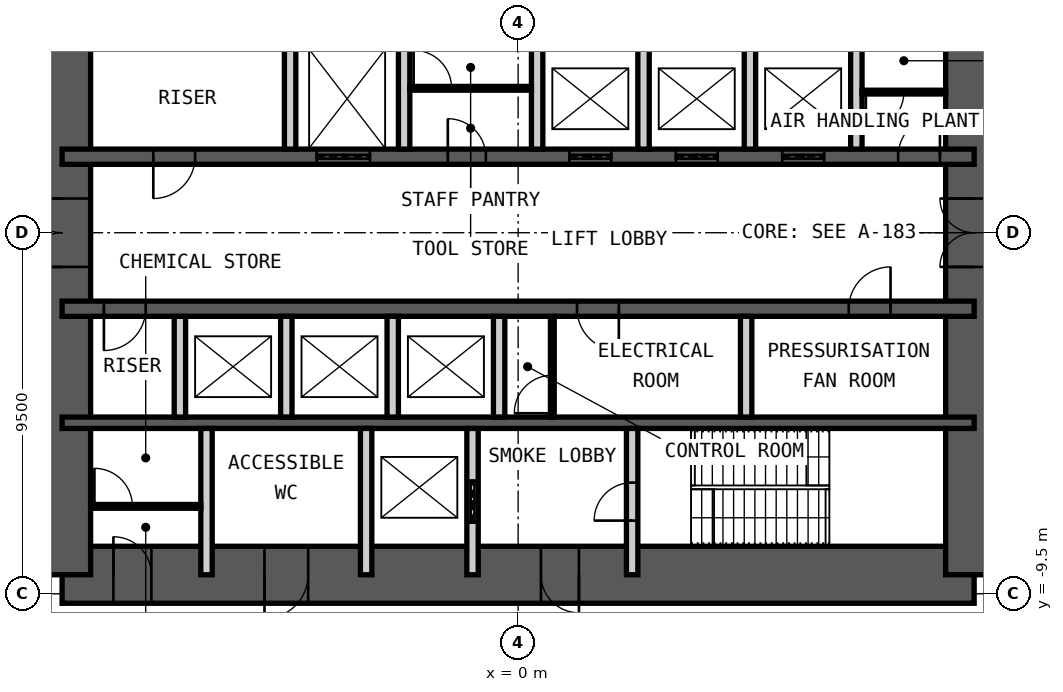
"""IFC4 building model, lengths in metres.
Left out: names, types, materials, properties, quantities, classifications, styles, units other than length and angle.
Written with IfcOpenShell. Run it as: python <this file> out.ifc"""

import sys

from ifc_helpers import new_model, si_unit, direction, frame, frame_2d, origin, place, context, subcontext, project, spatial, rectangle, extrude, element, fill, save


model = new_model("IFC4")
c1 = context("Model", 3, precision=1e-05, world=origin(), true_north=direction((0.0, 1.0)))
c2 = subcontext(c1, "Body", "Model", "MODEL_VIEW")
j1 = project(units=[si_unit("LENGTHUNIT", "METRE"), si_unit("PLANEANGLEUNIT", "RADIAN")], contexts=[c1])
p1 = place(None, origin())
s1 = spatial("IfcSite", under=j1, at=p1, CompositionType="ELEMENT")
p2 = place(p1, origin())
s2 = spatial("IfcBuilding", under=s1, at=p2, CompositionType="ELEMENT")
p3 = place(p2, frame((0.0, 0.0, 67.0)))
s3 = spatial("IfcBuildingStorey", under=s2, at=p3, CompositionType="ELEMENT", Elevation=67.0)
p4 = place(p3, frame((-12.0, -9.0, 0.0), z_axis=(0.0, 0.0, 1.0), x_axis=(1.0, 0.0, 0.0)))
e1 = element("IfcWall", 1, at=p4, inside=s3, PredefinedType="SHEAR", context=c2, shape_type="SweptSolid", body=[
    extrude(rectangle(XDim=24.0, YDim=1.5, at=frame_2d((12.0, 0.0))), origin(), (0.0, 0.0, 1.0), 5.0),
])
p5 = place(p4, frame((1.35, 0.0, 0.0)))
e2 = element("IfcOpeningElement", 2, at=p5, cuts=e1, PredefinedType="OPENING", context=c2, shape_type="SweptSolid", body=[
    extrude(rectangle(XDim=1.0, YDim=2.1, at=frame_2d((0.5, 1.05))), frame((0.0, 0.76, 0.0), z_axis=(0.0, -1.0, 0.0), x_axis=(1.0, 0.0, 0.0)), (0.0, 0.0, 1.0), 1.52),
])
p6 = place(p4, frame((5.325, 0.0, 0.0)))
e3 = element("IfcOpeningElement", 3, at=p6, cuts=e1, PredefinedType="OPENING", context=c2, shape_type="SweptSolid", body=[
    extrude(rectangle(XDim=1.15, YDim=2.1, at=frame_2d((0.575, 1.05))), frame((0.0, 0.76, 0.0), z_axis=(0.0, -1.0, 0.0), x_axis=(1.0, 0.0, 0.0)), (0.0, 0.0, 1.0), 1.52),
])
p7 = place(p4, frame((12.6, 0.0, 0.0)))
e4 = element("IfcOpeningElement", 4, at=p7, cuts=e1, PredefinedType="OPENING", context=c2, shape_type="SweptSolid", body=[
    extrude(rectangle(XDim=1.0, YDim=2.1, at=frame_2d((0.5, 1.05))), frame((0.0, 0.76, 0.0), z_axis=(0.0, -1.0, 0.0), x_axis=(1.0, 0.0, 0.0)), (0.0, 0.0, 1.0), 1.52),
])
p8 = place(p3, frame((12.0, -9.0, 0.0), z_axis=(0.0, 0.0, 1.0), x_axis=(0.0, 1.0, 0.0)))
e5 = element("IfcWall", 5, at=p8, inside=s3, PredefinedType="SHEAR", context=c2, shape_type="SweptSolid", body=[
    extrude(rectangle(XDim=18.0, YDim=1.5, at=frame_2d((9.0, 0.0))), origin(), (0.0, 0.0, 1.0), 5.0),
])
p9 = place(p8, frame((8.1, 0.0, 0.0)))
e6 = element("IfcOpeningElement", 6, at=p9, cuts=e5, PredefinedType="OPENING", context=c2, shape_type="SweptSolid", body=[
    extrude(rectangle(XDim=1.8, YDim=2.1, at=frame_2d((0.9, 1.05))), frame((0.0, 0.76, 0.0), z_axis=(0.0, -1.0, 0.0), x_axis=(1.0, 0.0, 0.0)), (0.0, 0.0, 1.0), 1.52),
])
p10 = place(p3, frame((-12.0, -9.0, 0.0), z_axis=(0.0, 0.0, 1.0), x_axis=(0.0, 1.0, 0.0)))
e7 = element("IfcWall", 7, at=p10, inside=s3, PredefinedType="SHEAR", context=c2, shape_type="SweptSolid", body=[
    extrude(rectangle(XDim=18.0, YDim=1.5, at=frame_2d((9.0, 0.0))), origin(), (0.0, 0.0, 1.0), 5.0),
])
p11 = place(p10, frame((8.1, 0.0, 0.0)))
e8 = element("IfcOpeningElement", 8, at=p11, cuts=e7, PredefinedType="OPENING", context=c2, shape_type="SweptSolid", body=[
    extrude(rectangle(XDim=1.8, YDim=2.1, at=frame_2d((0.9, 1.05))), frame((0.0, 0.76, 0.0), z_axis=(0.0, -1.0, 0.0), x_axis=(1.0, 0.0, 0.0)), (0.0, 0.0, 1.0), 1.52),
])
p12 = place(p3, frame((-12.0, 2.0, 0.0), z_axis=(0.0, 0.0, 1.0), x_axis=(1.0, 0.0, 0.0)))
e9 = element("IfcWall", 9, at=p12, inside=s3, PredefinedType="SHEAR", context=c2, shape_type="SweptSolid", body=[
    extrude(rectangle(XDim=24.0, YDim=0.4, at=frame_2d((12.0, 0.0))), origin(), (0.0, 0.0, 1.0), 5.0),
])
p13 = place(p12, frame((2.4, 0.0, 0.0)))
e10 = element("IfcOpeningElement", 10, at=p13, cuts=e9, PredefinedType="OPENING", context=c2, shape_type="SweptSolid", body=[
    extrude(rectangle(XDim=1.1, YDim=2.1, at=frame_2d((0.55, 1.05))), frame((0.0, 0.21, 0.0), z_axis=(0.0, -1.0, 0.0), x_axis=(1.0, 0.0, 0.0)), (0.0, 0.0, 1.0), 0.42),
])
p14 = place(p12, frame((22.0, 0.0, 0.0)))
e11 = element("IfcOpeningElement", 11, at=p14, cuts=e9, PredefinedType="OPENING", context=c2, shape_type="SweptSolid", body=[
    extrude(rectangle(XDim=1.1, YDim=2.1, at=frame_2d((0.55, 1.05))), frame((0.0, 0.21, 0.0), z_axis=(0.0, -1.0, 0.0), x_axis=(1.0, 0.0, 0.0)), (0.0, 0.0, 1.0), 0.42),
])
p15 = place(p12, frame((10.15, 0.0, 0.0)))
e12 = element("IfcOpeningElement", 12, at=p15, cuts=e9, PredefinedType="OPENING", context=c2, shape_type="SweptSolid", body=[
    extrude(rectangle(XDim=1.0, YDim=2.1, at=frame_2d((0.5, 1.05))), frame((0.0, 0.21, 0.0), z_axis=(0.0, -1.0, 0.0), x_axis=(1.0, 0.0, 0.0)), (0.0, 0.0, 1.0), 0.42),
])
p16 = place(p12, frame((6.7, 0.0, 0.0)))
e13 = element("IfcOpeningElement", 13, at=p16, cuts=e9, PredefinedType="OPENING", context=c2, shape_type="SweptSolid", body=[
    extrude(rectangle(XDim=1.4, YDim=2.4, at=frame_2d((0.7, 1.2))), frame((0.0, 0.21, 0.0), z_axis=(0.0, -1.0, 0.0), x_axis=(1.0, 0.0, 0.0)), (0.0, 0.0, 1.0), 0.42),
])
p17 = place(p12, frame((13.35, 0.0, 0.0)))
e14 = element("IfcOpeningElement", 14, at=p17, cuts=e9, PredefinedType="OPENING", context=c2, shape_type="SweptSolid", body=[
    extrude(rectangle(XDim=1.1, YDim=2.4, at=frame_2d((0.55, 1.2))), frame((0.0, 0.21, 0.0), z_axis=(0.0, -1.0, 0.0), x_axis=(1.0, 0.0, 0.0)), (0.0, 0.0, 1.0), 0.42),
])
p18 = place(p12, frame((16.15, 0.0, 0.0)))
e15 = element("IfcOpeningElement", 15, at=p18, cuts=e9, PredefinedType="OPENING", context=c2, shape_type="SweptSolid", body=[
    extrude(rectangle(XDim=1.1, YDim=2.4, at=frame_2d((0.55, 1.2))), frame((0.0, 0.21, 0.0), z_axis=(0.0, -1.0, 0.0), x_axis=(1.0, 0.0, 0.0)), (0.0, 0.0, 1.0), 0.42),
])
p19 = place(p12, frame((18.95, 0.0, 0.0)))
e16 = element("IfcOpeningElement", 16, at=p19, cuts=e9, PredefinedType="OPENING", context=c2, shape_type="SweptSolid", body=[
    extrude(rectangle(XDim=1.1, YDim=2.4, at=frame_2d((0.55, 1.2))), frame((0.0, 0.21, 0.0), z_axis=(0.0, -1.0, 0.0), x_axis=(1.0, 0.0, 0.0)), (0.0, 0.0, 1.0), 0.42),
])
p20 = place(p3, frame((-12.0, -2.0, 0.0), z_axis=(0.0, 0.0, 1.0), x_axis=(1.0, 0.0, 0.0)))
e17 = element("IfcWall", 17, at=p20, inside=s3, PredefinedType="SHEAR", context=c2, shape_type="SweptSolid", body=[
    extrude(rectangle(XDim=24.0, YDim=0.4, at=frame_2d((12.0, 0.0))), origin(), (0.0, 0.0, 1.0), 5.0),
])
p21 = place(p20, frame((1.1, 0.0, 0.0)))
e18 = element("IfcOpeningElement", 18, at=p21, cuts=e17, PredefinedType="OPENING", context=c2, shape_type="SweptSolid", body=[
    extrude(rectangle(XDim=1.1, YDim=2.1, at=frame_2d((0.55, 1.05))), frame((0.0, 0.21, 0.0), z_axis=(0.0, -1.0, 0.0), x_axis=(1.0, 0.0, 0.0)), (0.0, 0.0, 1.0), 0.42),
])
p22 = place(p20, frame((13.55, 0.0, 0.0)))
e19 = element("IfcOpeningElement", 19, at=p22, cuts=e17, PredefinedType="OPENING", context=c2, shape_type="SweptSolid", body=[
    extrude(rectangle(XDim=1.1, YDim=2.1, at=frame_2d((0.55, 1.05))), frame((0.0, 0.21, 0.0), z_axis=(0.0, -1.0, 0.0), x_axis=(1.0, 0.0, 0.0)), (0.0, 0.0, 1.0), 0.42),
])
p23 = place(p20, frame((20.7, 0.0, 0.0)))
e20 = element("IfcOpeningElement", 20, at=p23, cuts=e17, PredefinedType="OPENING", context=c2, shape_type="SweptSolid", body=[
    extrude(rectangle(XDim=1.1, YDim=2.1, at=frame_2d((0.55, 1.05))), frame((0.0, 0.21, 0.0), z_axis=(0.0, -1.0, 0.0), x_axis=(1.0, 0.0, 0.0)), (0.0, 0.0, 1.0), 0.42),
])
p24 = place(p3, frame((-12.0, -5.0, 0.0), z_axis=(0.0, 0.0, 1.0), x_axis=(1.0, 0.0, 0.0)))
e21 = element("IfcWall", 21, at=p24, inside=s3, PredefinedType="SHEAR", context=c2, shape_type="SweptSolid", body=[
    extrude(rectangle(XDim=24.0, YDim=0.3, at=frame_2d((12.0, 0.0))), origin(), (0.0, 0.0, 1.0), 5.0),
])
for number, where, z_axis, x_axis in (
    (22, (-6.0, 2.2, 0.0), (0.0, 0.0, 1.0), (0.0, 1.0, 0.0)),
    (23, (-3.0, 2.2, 0.0), (0.0, 0.0, 1.0), (0.0, 1.0, 0.0)),
    (24, (0.5, 2.2, 0.0), (0.0, 0.0, 1.0), (0.0, 1.0, 0.0)),
    (25, (3.3, 2.2, 0.0), (0.0, 0.0, 1.0), (0.0, 1.0, 0.0)),
    (26, (6.1, 2.2, 0.0), (0.0, 0.0, 1.0), (0.0, 1.0, 0.0)),
    (27, (8.9, 2.2, 0.0), (0.0, 0.0, 1.0), (0.0, 1.0, 0.0)),
    (28, (-8.9, -4.85, 0.0), (0.0, 0.0, 1.0), (0.0, 1.0, 0.0)),
    (29, (-6.1, -4.85, 0.0), (0.0, 0.0, 1.0), (0.0, 1.0, 0.0)),
    (30, (-3.3, -4.85, 0.0), (0.0, 0.0, 1.0), (0.0, 1.0, 0.0)),
    (31, (-0.5, -4.85, 0.0), (0.0, 0.0, 1.0), (0.0, 1.0, 0.0)),
    (32, (6.0, -4.85, 0.0), (0.0, 0.0, 1.0), (0.0, 1.0, 0.0)),
):
    element("IfcWall", number, at=place(p3, frame(where, z_axis=z_axis, x_axis=x_axis)), inside=s3, PredefinedType="PARTITIONING", context=c2, shape_type="SweptSolid", body=[
        extrude(rectangle(XDim=2.65, YDim=0.3, at=frame_2d((1.325, 0.0))), origin(), (0.0, 0.0, 1.0), 4.78),
    ])
for number, where, z_axis, x_axis in (
    (33, (-8.2, -9.0, 0.0), (0.0, 0.0, 1.0), (0.0, 1.0, 0.0)),
    (34, (-4.0, -9.0, 0.0), (0.0, 0.0, 1.0), (0.0, 1.0, 0.0)),
):
    element("IfcWall", number, at=place(p3, frame(where, z_axis=z_axis, x_axis=x_axis)), inside=s3, PredefinedType="PARTITIONING", context=c2, shape_type="SweptSolid", body=[
        extrude(rectangle(XDim=3.85, YDim=0.3, at=frame_2d((1.925, 0.0))), origin(), (0.0, 0.0, 1.0), 4.78),
    ])
p25 = place(p3, frame((-1.2, -9.0, 0.0), z_axis=(0.0, 0.0, 1.0), x_axis=(0.0, 1.0, 0.0)))
e35 = element("IfcWall", 35, at=p25, inside=s3, PredefinedType="PARTITIONING", context=c2, shape_type="SweptSolid", body=[
    extrude(rectangle(XDim=3.85, YDim=0.3, at=frame_2d((1.925, 0.0))), origin(), (0.0, 0.0, 1.0), 4.78),
])
p26 = place(p25, frame((1.375, 0.0, 0.0)))
e36 = element("IfcOpeningElement", 36, at=p26, cuts=e35, PredefinedType="OPENING", context=c2, shape_type="SweptSolid", body=[
    extrude(rectangle(XDim=1.1, YDim=2.4, at=frame_2d((0.55, 1.2))), frame((0.0, 0.16, 0.0), z_axis=(0.0, -1.0, 0.0), x_axis=(1.0, 0.0, 0.0)), (0.0, 0.0, 1.0), 0.32),
])
p27 = place(p3, frame((3.0, -9.0, 0.0), z_axis=(0.0, 0.0, 1.0), x_axis=(0.0, 1.0, 0.0)))
e37 = element("IfcWall", 37, at=p27, inside=s3, PredefinedType="PARTITIONING", context=c2, shape_type="SweptSolid", body=[
    extrude(rectangle(XDim=3.85, YDim=0.3, at=frame_2d((1.925, 0.0))), origin(), (0.0, 0.0, 1.0), 4.78),
])
p28 = place(p27, frame((1.425, 0.0, 0.0)))
e38 = element("IfcOpeningElement", 38, at=p28, cuts=e37, PredefinedType="OPENING", context=c2, shape_type="SweptSolid", body=[
    extrude(rectangle(XDim=1.0, YDim=2.1, at=frame_2d((0.5, 1.05))), frame((0.0, 0.16, 0.0), z_axis=(0.0, -1.0, 0.0), x_axis=(1.0, 0.0, 0.0)), (0.0, 0.0, 1.0), 0.32),
])
p29 = place(p3, frame((-2.85, 3.8, 0.0), z_axis=(0.0, 0.0, 1.0), x_axis=(1.0, 0.0, 0.0)))
e39 = element("IfcWall", 39, at=p29, inside=s3, PredefinedType="PARTITIONING", context=c2, shape_type="SweptSolid", body=[
    extrude(rectangle(XDim=3.2, YDim=0.1, at=frame_2d((1.6, 0.0))), origin(), (0.0, 0.0, 1.0), 4.78),
])
p30 = place(p29, frame((0.1, 0.0, 0.0)))
e40 = element("IfcOpeningElement", 40, at=p30, cuts=e39, PredefinedType="OPENING", context=c2, shape_type="SweptSolid", body=[
    extrude(rectangle(XDim=1.0, YDim=2.4, at=frame_2d((0.5, 1.2))), frame((0.0, 0.06, 0.0), z_axis=(0.0, -1.0, 0.0), x_axis=(1.0, 0.0, 0.0)), (0.0, 0.0, 1.0), 0.12),
])
p31 = place(p3, frame((0.9, -4.85, 0.0), z_axis=(0.0, 0.0, 1.0), x_axis=(0.0, 1.0, 0.0)))
e41 = element("IfcWall", 41, at=p31, inside=s3, PredefinedType="PARTITIONING", context=c2, shape_type="SweptSolid", body=[
    extrude(rectangle(XDim=2.65, YDim=0.1, at=frame_2d((1.325, 0.0))), origin(), (0.0, 0.0, 1.0), 4.78),
])
p32 = place(p31, frame((0.1, 0.0, 0.0)))
e42 = element("IfcOpeningElement", 42, at=p32, cuts=e41, PredefinedType="OPENING", context=c2, shape_type="SweptSolid", body=[
    extrude(rectangle(XDim=1.0, YDim=2.4, at=frame_2d((0.5, 1.2))), frame((0.0, 0.06, 0.0), z_axis=(0.0, -1.0, 0.0), x_axis=(1.0, 0.0, 0.0)), (0.0, 0.0, 1.0), 0.12),
])
p33 = place(p3, frame((-11.25, -7.2, 0.0), z_axis=(0.0, 0.0, 1.0), x_axis=(1.0, 0.0, 0.0)))
e43 = element("IfcWall", 43, at=p33, inside=s3, PredefinedType="PARTITIONING", context=c2, shape_type="SweptSolid", body=[
    extrude(rectangle(XDim=2.9, YDim=0.1, at=frame_2d((1.45, 0.0))), origin(), (0.0, 0.0, 1.0), 4.78),
])
p34 = place(p33, frame((0.1, 0.0, 0.0)))
e44 = element("IfcOpeningElement", 44, at=p34, cuts=e43, PredefinedType="OPENING", context=c2, shape_type="SweptSolid", body=[
    extrude(rectangle(XDim=1.0, YDim=2.4, at=frame_2d((0.5, 1.2))), frame((0.0, 0.06, 0.0), z_axis=(0.0, -1.0, 0.0), x_axis=(1.0, 0.0, 0.0)), (0.0, 0.0, 1.0), 0.12),
])
p35 = place(p3, frame((9.05, 3.7, 0.0), z_axis=(0.0, 0.0, 1.0), x_axis=(1.0, 0.0, 0.0)))
e45 = element("IfcWall", 45, at=p35, inside=s3, PredefinedType="PARTITIONING", context=c2, shape_type="SweptSolid", body=[
    extrude(rectangle(XDim=2.2, YDim=0.1, at=frame_2d((1.1, 0.0))), origin(), (0.0, 0.0, 1.0), 4.78),
])
p36 = place(p35, frame((0.1, 0.0, 0.0)))
e46 = element("IfcOpeningElement", 46, at=p36, cuts=e45, PredefinedType="OPENING", context=c2, shape_type="SweptSolid", body=[
    extrude(rectangle(XDim=1.0, YDim=2.4, at=frame_2d((0.5, 1.2))), frame((0.0, 0.06, 0.0), z_axis=(0.0, -1.0, 0.0), x_axis=(1.0, 0.0, 0.0)), (0.0, 0.0, 1.0), 0.12),
])
p37 = place(p5, origin())
e47 = element("IfcDoor", 47, at=p37, inside=s3, OperationType="SINGLE_SWING_RIGHT", PredefinedType="DOOR", context=c2, shape_type="SweptSolid", body=[
    extrude(rectangle(XDim=1.0, YDim=2.1, at=frame_2d((0.5, 1.05))), frame((0.0, 0.025, 0.0), z_axis=(0.0, -1.0, 0.0), x_axis=(1.0, 0.0, 0.0)), (0.0, 0.0, 1.0), 0.05),
])
fill(e2, e47)
p38 = place(p6, origin())
e48 = element("IfcDoor", 48, at=p38, inside=s3, OperationType="SINGLE_SWING_LEFT", PredefinedType="DOOR", context=c2, shape_type="SweptSolid", body=[
    extrude(rectangle(XDim=1.15, YDim=2.1, at=frame_2d((0.575, 1.05))), frame((0.0, 0.025, 0.0), z_axis=(0.0, -1.0, 0.0), x_axis=(1.0, 0.0, 0.0)), (0.0, 0.0, 1.0), 0.05),
])
fill(e3, e48)
p39 = place(p7, origin())
e49 = element("IfcDoor", 49, at=p39, inside=s3, OperationType="SINGLE_SWING_RIGHT", PredefinedType="DOOR", context=c2, shape_type="SweptSolid", body=[
    extrude(rectangle(XDim=1.0, YDim=2.1, at=frame_2d((0.5, 1.05))), frame((0.0, 0.025, 0.0), z_axis=(0.0, -1.0, 0.0), x_axis=(1.0, 0.0, 0.0)), (0.0, 0.0, 1.0), 0.05),
])
fill(e4, e49)
p40 = place(p28, origin())
e50 = element("IfcDoor", 50, at=p40, inside=s3, OperationType="SINGLE_SWING_RIGHT", PredefinedType="DOOR", context=c2, shape_type="SweptSolid", body=[
    extrude(rectangle(XDim=1.0, YDim=2.1, at=frame_2d((0.5, 1.05))), frame((0.0, 0.025, 0.0), z_axis=(0.0, -1.0, 0.0), x_axis=(1.0, 0.0, 0.0)), (0.0, 0.0, 1.0), 0.05),
])
fill(e38, e50)
p41 = place(p13, origin())
e51 = element("IfcDoor", 51, at=p41, inside=s3, OperationType="SINGLE_SWING_LEFT", PredefinedType="DOOR", context=c2, shape_type="SweptSolid", body=[
    extrude(rectangle(XDim=1.1, YDim=2.1, at=frame_2d((0.55, 1.05))), frame((0.0, 0.025, 0.0), z_axis=(0.0, -1.0, 0.0), x_axis=(1.0, 0.0, 0.0)), (0.0, 0.0, 1.0), 0.05),
])
fill(e10, e51)
p42 = place(p21, origin())
e52 = element("IfcDoor", 52, at=p42, inside=s3, OperationType="SINGLE_SWING_LEFT", PredefinedType="DOOR", context=c2, shape_type="SweptSolid", body=[
    extrude(rectangle(XDim=1.1, YDim=2.1, at=frame_2d((0.55, 1.05))), frame((0.0, 0.025, 0.0), z_axis=(0.0, -1.0, 0.0), x_axis=(1.0, 0.0, 0.0)), (0.0, 0.0, 1.0), 0.05),
])
fill(e18, e52)
p43 = place(p14, origin())
e53 = element("IfcDoor", 53, at=p43, inside=s3, OperationType="SINGLE_SWING_LEFT", PredefinedType="DOOR", context=c2, shape_type="SweptSolid", body=[
    extrude(rectangle(XDim=1.1, YDim=2.1, at=frame_2d((0.55, 1.05))), frame((0.0, 0.025, 0.0), z_axis=(0.0, -1.0, 0.0), x_axis=(1.0, 0.0, 0.0)), (0.0, 0.0, 1.0), 0.05),
])
fill(e11, e53)
p44 = place(p15, origin())
e54 = element("IfcDoor", 54, at=p44, inside=s3, OperationType="SINGLE_SWING_RIGHT", PredefinedType="DOOR", context=c2, shape_type="SweptSolid", body=[
    extrude(rectangle(XDim=1.0, YDim=2.1, at=frame_2d((0.5, 1.05))), frame((0.0, 0.025, 0.0), z_axis=(0.0, -1.0, 0.0), x_axis=(1.0, 0.0, 0.0)), (0.0, 0.0, 1.0), 0.05),
])
fill(e12, e54)
p45 = place(p22, origin())
e55 = element("IfcDoor", 55, at=p45, inside=s3, OperationType="SINGLE_SWING_RIGHT", PredefinedType="DOOR", context=c2, shape_type="SweptSolid", body=[
    extrude(rectangle(XDim=1.1, YDim=2.1, at=frame_2d((0.55, 1.05))), frame((0.0, 0.025, 0.0), z_axis=(0.0, -1.0, 0.0), x_axis=(1.0, 0.0, 0.0)), (0.0, 0.0, 1.0), 0.05),
])
fill(e19, e55)
p46 = place(p23, origin())
e56 = element("IfcDoor", 56, at=p46, inside=s3, OperationType="SINGLE_SWING_LEFT", PredefinedType="DOOR", context=c2, shape_type="SweptSolid", body=[
    extrude(rectangle(XDim=1.1, YDim=2.1, at=frame_2d((0.55, 1.05))), frame((0.0, 0.025, 0.0), z_axis=(0.0, -1.0, 0.0), x_axis=(1.0, 0.0, 0.0)), (0.0, 0.0, 1.0), 0.05),
])
fill(e20, e56)
p47 = place(p9, origin())
e57 = element("IfcDoor", 57, at=p47, inside=s3, OperationType="DOUBLE_DOOR_DOUBLE_SWING", PredefinedType="DOOR", context=c2, shape_type="SweptSolid", body=[
    extrude(rectangle(XDim=1.8, YDim=2.1, at=frame_2d((0.9, 1.05))), frame((0.0, 0.025, 0.0), z_axis=(0.0, -1.0, 0.0), x_axis=(1.0, 0.0, 0.0)), (0.0, 0.0, 1.0), 0.05),
])
fill(e6, e57)
p48 = place(p11, origin())
e58 = element("IfcDoor", 58, at=p48, inside=s3, OperationType="DOUBLE_DOOR_DOUBLE_SWING", PredefinedType="DOOR", context=c2, shape_type="SweptSolid", body=[
    extrude(rectangle(XDim=1.8, YDim=2.1, at=frame_2d((0.9, 1.05))), frame((0.0, 0.025, 0.0), z_axis=(0.0, -1.0, 0.0), x_axis=(1.0, 0.0, 0.0)), (0.0, 0.0, 1.0), 0.05),
])
fill(e8, e58)
p49 = place(p26, origin())
e59 = element("IfcDoor", 59, at=p49, inside=s3, OperationType="DOUBLE_DOOR_SLIDING", PredefinedType="DOOR", context=c2, shape_type="SweptSolid", body=[
    extrude(rectangle(XDim=1.1, YDim=2.4, at=frame_2d((0.55, 1.2))), frame((0.0, 0.025, 0.0), z_axis=(0.0, -1.0, 0.0), x_axis=(1.0, 0.0, 0.0)), (0.0, 0.0, 1.0), 0.05),
])
fill(e36, e59)
p50 = place(p16, origin())
e60 = element("IfcDoor", 60, at=p50, inside=s3, OperationType="DOUBLE_DOOR_SLIDING", PredefinedType="DOOR", context=c2, shape_type="SweptSolid", body=[
    extrude(rectangle(XDim=1.4, YDim=2.4, at=frame_2d((0.7, 1.2))), frame((0.0, 0.025, 0.0), z_axis=(0.0, -1.0, 0.0), x_axis=(1.0, 0.0, 0.0)), (0.0, 0.0, 1.0), 0.05),
])
fill(e13, e60)
p51 = place(p17, origin())
e61 = element("IfcDoor", 61, at=p51, inside=s3, OperationType="DOUBLE_DOOR_SLIDING", PredefinedType="DOOR", context=c2, shape_type="SweptSolid", body=[
    extrude(rectangle(XDim=1.1, YDim=2.4, at=frame_2d((0.55, 1.2))), frame((0.0, 0.025, 0.0), z_axis=(0.0, -1.0, 0.0), x_axis=(1.0, 0.0, 0.0)), (0.0, 0.0, 1.0), 0.05),
])
fill(e14, e61)
p52 = place(p18, origin())
e62 = element("IfcDoor", 62, at=p52, inside=s3, OperationType="DOUBLE_DOOR_SLIDING", PredefinedType="DOOR", context=c2, shape_type="SweptSolid", body=[
    extrude(rectangle(XDim=1.1, YDim=2.4, at=frame_2d((0.55, 1.2))), frame((0.0, 0.025, 0.0), z_axis=(0.0, -1.0, 0.0), x_axis=(1.0, 0.0, 0.0)), (0.0, 0.0, 1.0), 0.05),
])
fill(e15, e62)
p53 = place(p19, origin())
e63 = element("IfcDoor", 63, at=p53, inside=s3, OperationType="DOUBLE_DOOR_SLIDING", PredefinedType="DOOR", context=c2, shape_type="SweptSolid", body=[
    extrude(rectangle(XDim=1.1, YDim=2.4, at=frame_2d((0.55, 1.2))), frame((0.0, 0.025, 0.0), z_axis=(0.0, -1.0, 0.0), x_axis=(1.0, 0.0, 0.0)), (0.0, 0.0, 1.0), 0.05),
])
fill(e16, e63)
p54 = place(p30, origin())
e64 = element("IfcDoor", 64, at=p54, inside=s3, OperationType="SINGLE_SWING_RIGHT", PredefinedType="DOOR", context=c2, shape_type="SweptSolid", body=[
    extrude(rectangle(XDim=1.0, YDim=2.4, at=frame_2d((0.5, 1.2))), frame((0.0, 0.025, 0.0), z_axis=(0.0, -1.0, 0.0), x_axis=(1.0, 0.0, 0.0)), (0.0, 0.0, 1.0), 0.05),
])
fill(e40, e64)
p55 = place(p32, origin())
e65 = element("IfcDoor", 65, at=p55, inside=s3, OperationType="SINGLE_SWING_RIGHT", PredefinedType="DOOR", context=c2, shape_type="SweptSolid", body=[
    extrude(rectangle(XDim=1.0, YDim=2.4, at=frame_2d((0.5, 1.2))), frame((0.0, 0.025, 0.0), z_axis=(0.0, -1.0, 0.0), x_axis=(1.0, 0.0, 0.0)), (0.0, 0.0, 1.0), 0.05),
])
fill(e42, e65)
p56 = place(p34, origin())
e66 = element("IfcDoor", 66, at=p56, inside=s3, OperationType="SINGLE_SWING_RIGHT", PredefinedType="DOOR", context=c2, shape_type="SweptSolid", body=[
    extrude(rectangle(XDim=1.0, YDim=2.4, at=frame_2d((0.5, 1.2))), frame((0.0, 0.025, 0.0), z_axis=(0.0, -1.0, 0.0), x_axis=(1.0, 0.0, 0.0)), (0.0, 0.0, 1.0), 0.05),
])
fill(e44, e66)
p57 = place(p36, origin())
e67 = element("IfcDoor", 67, at=p57, inside=s3, OperationType="SINGLE_SWING_LEFT", PredefinedType="DOOR", context=c2, shape_type="SweptSolid", body=[
    extrude(rectangle(XDim=1.0, YDim=2.4, at=frame_2d((0.5, 1.2))), frame((0.0, 0.025, 0.0), z_axis=(0.0, -1.0, 0.0), x_axis=(1.0, 0.0, 0.0)), (0.0, 0.0, 1.0), 0.05),
])
fill(e46, e67)
save(model, sys.argv[1])
